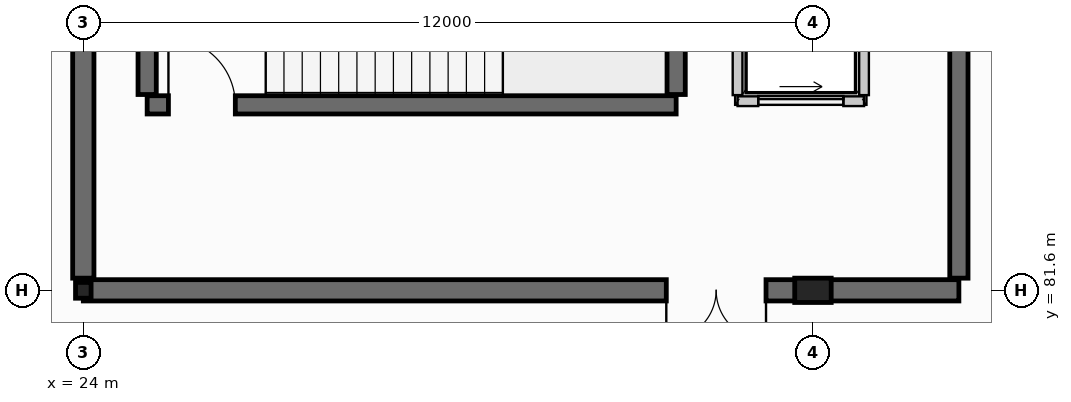
"""IFC4 building model, lengths in metres.
Left out: names, types, materials, properties, quantities, classifications, styles, units other than length and angle.
Written with IfcOpenShell. Run it as: python <this file> out.ifc"""

import sys

from ifc_helpers import new_model, si_unit, direction, frame, frame_2d, origin, origin_2d, place, context, subcontext, project, spatial, rectangle, i_section, extrude, element, fill, save


model = new_model("IFC4")
c1 = context("Model", 3, precision=1e-05, world=origin(), true_north=direction((0.0, 1.0)))
c2 = subcontext(c1, "Body", "Model", "MODEL_VIEW")
j1 = project(units=[si_unit("LENGTHUNIT", "METRE"), si_unit("PLANEANGLEUNIT", "RADIAN")], contexts=[c1])
p1 = place(None, origin())
s1 = spatial("IfcSite", under=j1, at=p1, CompositionType="ELEMENT")
p2 = place(p1, origin())
s2 = spatial("IfcBuilding", under=s1, at=p2, CompositionType="ELEMENT")
p3 = place(p2, frame((0.0, 0.0, -4.8)))
s3 = spatial("IfcBuildingStorey", under=s2, at=p3, CompositionType="ELEMENT", Elevation=-4.8)
p4 = place(p3, frame((24.0, 81.6, 0.0), z_axis=(0.0, 0.0, 1.0), x_axis=(1.0, 0.0, 0.0)))
e1 = element("IfcColumn", 1, at=p4, inside=s3, PredefinedType="COLUMN", context=c2, shape_type="SweptSolid", body=[
    extrude(i_section(OverallWidth=0.256, OverallDepth=0.26, WebThickness=0.01, FlangeThickness=0.017, at=origin_2d()), origin(), (0.0, 0.0, 1.0), 4.8),
])
p5 = place(p3, frame((36.0, 81.6, 0.0), z_axis=(0.0, 0.0, 1.0), x_axis=(0.0, 1.0, 0.0)))
e2 = element("IfcColumn", 2, at=p5, inside=s3, PredefinedType="PILASTER", context=c2, shape_type="SweptSolid", body=[
    extrude(rectangle(XDim=0.4, YDim=0.6, at=origin_2d()), origin(), (0.0, 0.0, 1.0), 4.8),
])
p6 = place(p3, frame((38.4, 81.6, 0.0), z_axis=(0.0, 0.0, 1.0), x_axis=(-1.0, 0.0, 0.0)))
e3 = element("IfcWall", 3, at=p6, inside=s3, PredefinedType="SHEAR", context=c2, shape_type="SweptSolid", body=[
    extrude(rectangle(XDim=14.4, YDim=0.35, at=frame_2d((7.2, 0.0))), origin(), (0.0, 0.0, 1.0), 4.8),
])
p7 = place(p6, frame((3.172, 0.0, 0.0)))
e4 = element("IfcOpeningElement", 4, at=p7, cuts=e3, PredefinedType="OPENING", context=c2, shape_type="SweptSolid", body=[
    extrude(rectangle(XDim=1.64, YDim=2.2, at=frame_2d((0.82, 1.1))), frame((0.0, 0.185, 0.0), z_axis=(0.0, -1.0, 0.0), x_axis=(1.0, 0.0, 0.0)), (0.0, 0.0, 1.0), 0.37),
])
p8 = place(p3, frame((24.0, 81.8, 0.0), z_axis=(0.0, 0.0, 1.0), x_axis=(0.0, 1.0, 0.0)))
e5 = element("IfcWall", 5, at=p8, inside=s3, PredefinedType="SHEAR", context=c2, shape_type="SweptSolid", body=[
    extrude(rectangle(XDim=8.0, YDim=0.35, at=frame_2d((4.0, 0.0))), origin(), (0.0, 0.0, 1.0), 4.8),
])
p9 = place(p3, frame((38.4, 89.8, 0.0), z_axis=(0.0, 0.0, 1.0), x_axis=(0.0, -1.0, 0.0)))
e6 = element("IfcWall", 6, at=p9, inside=s3, PredefinedType="SHEAR", context=c2, shape_type="SweptSolid", body=[
    extrude(rectangle(XDim=8.0, YDim=0.3, at=frame_2d((4.0, 0.0))), origin(), (0.0, 0.0, 1.0), 4.8),
])
p10 = place(p3, frame((25.05, 84.65, 0.0), z_axis=(0.0, 0.0, 1.0), x_axis=(1.0, 0.0, 0.0)))
e7 = element("IfcWall", 7, at=p10, inside=s3, PredefinedType="SHEAR", context=c2, shape_type="SweptSolid", body=[
    extrude(rectangle(XDim=8.7, YDim=0.3, at=frame_2d((4.35, 0.0))), origin(), (0.0, 0.0, 1.0), 4.8),
])
p11 = place(p10, frame((0.35, 0.0, 0.0)))
e8 = element("IfcOpeningElement", 8, at=p11, cuts=e7, PredefinedType="OPENING", context=c2, shape_type="SweptSolid", body=[
    extrude(rectangle(XDim=1.1, YDim=2.15, at=frame_2d((0.55, 1.075))), frame((0.0, 0.16, 0.0), z_axis=(0.0, -1.0, 0.0), x_axis=(1.0, 0.0, 0.0)), (0.0, 0.0, 1.0), 0.32),
])
for number, where, z_axis, x_axis in (
    (9, (25.05, 84.82, 0.0), (0.0, 0.0, 1.0), (0.0, 1.0, 0.0)),
    (10, (33.75, 84.82, 0.0), (0.0, 0.0, 1.0), (0.0, 1.0, 0.0)),
):
    element("IfcWall", number, at=place(p3, frame(where, z_axis=z_axis, x_axis=x_axis)), inside=s3, PredefinedType="SHEAR", context=c2, shape_type="SweptSolid", body=[
        extrude(rectangle(XDim=3.76, YDim=0.3, at=frame_2d((1.88, 0.0))), origin(), (0.0, 0.0, 1.0), 4.8),
    ])
p12 = place(p3, frame((34.76, 84.71, 0.0), z_axis=(0.0, 0.0, 1.0), x_axis=(1.0, 0.0, 0.0)))
e11 = element("IfcWall", 11, at=p12, inside=s3, PredefinedType="PARTITIONING", context=c2, shape_type="SweptSolid", body=[
    extrude(rectangle(XDim=2.08, YDim=0.16, at=frame_2d((1.04, 0.0))), origin(), (0.0, 0.0, 1.0), 4.43),
])
p13 = place(p12, frame((0.34, 0.0, 0.0)))
e12 = element("IfcOpeningElement", 12, at=p13, cuts=e11, PredefinedType="OPENING", context=c2, shape_type="SweptSolid", body=[
    extrude(rectangle(XDim=1.4, YDim=2.2, at=frame_2d((0.7, 1.1))), frame((0.0, 0.09, 0.0), z_axis=(0.0, -1.0, 0.0), x_axis=(1.0, 0.0, 0.0)), (0.0, 0.0, 1.0), 0.18),
])
for number, where, z_axis, x_axis in (
    (13, (34.76, 87.59, 0.0), (0.0, 0.0, 1.0), (0.0, -1.0, 0.0)),
    (14, (36.84, 84.81, 0.0), (0.0, 0.0, 1.0), (0.0, 1.0, 0.0)),
):
    element("IfcWall", number, at=place(p3, frame(where, z_axis=z_axis, x_axis=x_axis)), inside=s3, PredefinedType="PARTITIONING", context=c2, shape_type="SweptSolid", body=[
        extrude(rectangle(XDim=2.78, YDim=0.16, at=frame_2d((1.39, 0.0))), origin(), (0.0, 0.0, 1.0), 4.43),
    ])
p14 = place(p13, origin())
e15 = element("IfcDoor", 15, at=p14, inside=s3, OperationType="SLIDING_TO_LEFT", PredefinedType="DOOR", context=c2, shape_type="SweptSolid", body=[
    extrude(rectangle(XDim=1.4, YDim=2.2, at=frame_2d((0.7, 1.1))), frame((0.0, 0.025, 0.0), z_axis=(0.0, -1.0, 0.0), x_axis=(1.0, 0.0, 0.0)), (0.0, 0.0, 1.0), 0.05),
])
fill(e12, e15)
p15 = place(p11, origin())
e16 = element("IfcDoor", 16, at=p15, inside=s3, OperationType="SINGLE_SWING_LEFT", PredefinedType="DOOR", context=c2, shape_type="SweptSolid", body=[
    extrude(rectangle(XDim=1.1, YDim=2.15, at=frame_2d((0.55, 1.075))), frame((0.0, 0.025, 0.0), z_axis=(0.0, -1.0, 0.0), x_axis=(1.0, 0.0, 0.0)), (0.0, 0.0, 1.0), 0.05),
])
fill(e8, e16)
p16 = place(p7, origin())
e17 = element("IfcDoor", 17, at=p16, inside=s3, OperationType="DOUBLE_DOOR_SINGLE_SWING", PredefinedType="DOOR", context=c2, shape_type="SweptSolid", body=[
    extrude(rectangle(XDim=1.64, YDim=2.2, at=frame_2d((0.82, 1.1))), frame((0.0, 0.025, 0.0), z_axis=(0.0, -1.0, 0.0), x_axis=(1.0, 0.0, 0.0)), (0.0, 0.0, 1.0), 0.05),
])
fill(e4, e17)
save(model, sys.argv[1])
